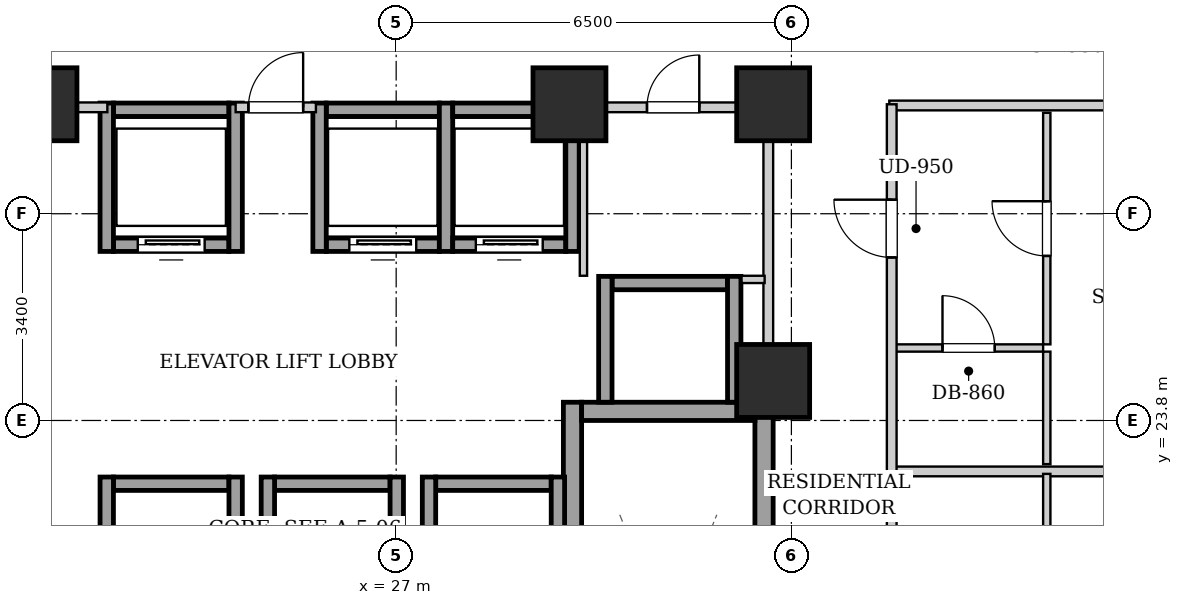
"""IFC4 building model, lengths in metres.
Left out: names, types, materials, properties, quantities, classifications, styles, units other than length and angle.
Written with IfcOpenShell. Run it as: python <this file> out.ifc"""

import sys

from ifc_helpers import new_model, si_unit, direction, frame, frame_2d, origin, origin_2d, place, context, subcontext, project, spatial, rectangle, extrude, element, fill, save


model = new_model("IFC4")
c1 = context("Model", 3, precision=1e-05, world=origin(), true_north=direction((0.0, 1.0)))
c2 = subcontext(c1, "Body", "Model", "MODEL_VIEW")
j1 = project(units=[si_unit("LENGTHUNIT", "METRE"), si_unit("PLANEANGLEUNIT", "RADIAN")], contexts=[c1])
p1 = place(None, origin())
s1 = spatial("IfcSite", under=j1, at=p1, CompositionType="ELEMENT")
p2 = place(p1, origin())
s2 = spatial("IfcBuilding", under=s1, at=p2, CompositionType="ELEMENT")
p3 = place(p2, frame((0.0, 0.0, 48.2)))
s3 = spatial("IfcBuildingStorey", under=s2, at=p3, CompositionType="ELEMENT", Elevation=48.2)
for number, where, z_axis, x_axis in (
    (1, (21.15, 29.0, 0.0), (0.0, 0.0, 1.0), (1.0, 0.0, 0.0)),
    (2, (29.85, 29.0, 0.0), (0.0, 0.0, 1.0), (1.0, 0.0, 0.0)),
    (3, (33.2, 29.0, 0.0), (0.0, 0.0, 1.0), (1.0, 0.0, 0.0)),
    (4, (33.2, 24.45, 0.0), (0.0, 0.0, 1.0), (1.0, 0.0, 0.0)),
):
    element("IfcColumn", number, at=place(p3, frame(where, z_axis=z_axis, x_axis=x_axis)), inside=s3, PredefinedType="COLUMN", context=c2, shape_type="SweptSolid", body=[
        extrude(rectangle(XDim=1.2, YDim=1.2, at=origin_2d()), origin(), (0.0, 0.0, 1.0), 3.2),
    ])
for number, where, z_axis, x_axis in (
    (5, (29.9, 15.1, 0.0), (0.0, 0.0, 1.0), (0.0, 1.0, 0.0)),
    (6, (33.05, 15.1, 0.0), (0.0, 0.0, 1.0), (0.0, 1.0, 0.0)),
):
    element("IfcWall", number, at=place(p3, frame(where, z_axis=z_axis, x_axis=x_axis)), inside=s3, PredefinedType="SHEAR", context=c2, shape_type="SweptSolid", body=[
        extrude(rectangle(XDim=9.0, YDim=0.3, at=frame_2d((4.5, 0.0))), origin(), (0.0, 0.0, 1.0), 2.94),
    ])
p4 = place(p3, frame((30.05, 23.95, 0.0), z_axis=(0.0, 0.0, 1.0), x_axis=(1.0, 0.0, 0.0)))
e7 = element("IfcWall", 7, at=p4, inside=s3, PredefinedType="SHEAR", context=c2, shape_type="SweptSolid", body=[
    extrude(rectangle(XDim=2.85, YDim=0.3, at=frame_2d((1.425, 0.0))), origin(), (0.0, 0.0, 1.0), 2.94),
])
p5 = place(p3, frame((22.35, 26.69, 0.0), z_axis=(0.0, 0.0, 1.0), x_axis=(1.0, 0.0, 0.0)))
e8 = element("IfcWall", 8, at=p5, inside=s3, PredefinedType="SHEAR", context=c2, shape_type="SweptSolid", body=[
    extrude(rectangle(XDim=1.9, YDim=0.22, at=frame_2d((0.95, 0.0))), origin(), (0.0, 0.0, 1.0), 2.94),
])
p6 = place(p5, frame((0.4, 0.0, 0.0)))
e9 = element("IfcOpeningElement", 9, at=p6, cuts=e8, PredefinedType="OPENING", context=c2, shape_type="SweptSolid", body=[
    extrude(rectangle(XDim=1.1, YDim=2.15, at=frame_2d((0.55, 1.075))), frame((0.0, 0.12, 0.0), z_axis=(0.0, -1.0, 0.0), x_axis=(1.0, 0.0, 0.0)), (0.0, 0.0, 1.0), 0.24),
])
p7 = place(p3, frame((22.35, 28.91, 0.0), z_axis=(0.0, 0.0, 1.0), x_axis=(1.0, 0.0, 0.0)))
e10 = element("IfcWall", 10, at=p7, inside=s3, PredefinedType="SHEAR", context=c2, shape_type="SweptSolid", body=[
    extrude(rectangle(XDim=1.9, YDim=0.22, at=frame_2d((0.95, 0.0))), origin(), (0.0, 0.0, 1.0), 2.94),
])
for number, where, z_axis, x_axis in (
    (11, (22.24, 26.58, 0.0), (0.0, 0.0, 1.0), (0.0, 1.0, 0.0)),
    (12, (24.36, 26.58, 0.0), (0.0, 0.0, 1.0), (0.0, 1.0, 0.0)),
):
    element("IfcWall", number, at=place(p3, frame(where, z_axis=z_axis, x_axis=x_axis)), inside=s3, PredefinedType="SHEAR", context=c2, shape_type="SweptSolid", body=[
        extrude(rectangle(XDim=2.44, YDim=0.22, at=frame_2d((1.22, 0.0))), origin(), (0.0, 0.0, 1.0), 2.94),
    ])
p8 = place(p3, frame((25.85, 26.69, 0.0), z_axis=(0.0, 0.0, 1.0), x_axis=(1.0, 0.0, 0.0)))
e13 = element("IfcWall", 13, at=p8, inside=s3, PredefinedType="SHEAR", context=c2, shape_type="SweptSolid", body=[
    extrude(rectangle(XDim=1.86, YDim=0.22, at=frame_2d((0.93, 0.0))), origin(), (0.0, 0.0, 1.0), 2.94),
])
p9 = place(p8, frame((0.38, 0.0, 0.0)))
e14 = element("IfcOpeningElement", 14, at=p9, cuts=e13, PredefinedType="OPENING", context=c2, shape_type="SweptSolid", body=[
    extrude(rectangle(XDim=1.1, YDim=2.15, at=frame_2d((0.55, 1.075))), frame((0.0, 0.12, 0.0), z_axis=(0.0, -1.0, 0.0), x_axis=(1.0, 0.0, 0.0)), (0.0, 0.0, 1.0), 0.24),
])
p10 = place(p3, frame((25.85, 28.91, 0.0), z_axis=(0.0, 0.0, 1.0), x_axis=(1.0, 0.0, 0.0)))
e15 = element("IfcWall", 15, at=p10, inside=s3, PredefinedType="SHEAR", context=c2, shape_type="SweptSolid", body=[
    extrude(rectangle(XDim=1.86, YDim=0.22, at=frame_2d((0.93, 0.0))), origin(), (0.0, 0.0, 1.0), 2.94),
])
for number, where, z_axis, x_axis in (
    (16, (25.74, 26.58, 0.0), (0.0, 0.0, 1.0), (0.0, 1.0, 0.0)),
    (17, (27.82, 26.58, 0.0), (0.0, 0.0, 1.0), (0.0, 1.0, 0.0)),
):
    element("IfcWall", number, at=place(p3, frame(where, z_axis=z_axis, x_axis=x_axis)), inside=s3, PredefinedType="SHEAR", context=c2, shape_type="SweptSolid", body=[
        extrude(rectangle(XDim=2.44, YDim=0.22, at=frame_2d((1.22, 0.0))), origin(), (0.0, 0.0, 1.0), 2.94),
    ])
p11 = place(p3, frame((27.93, 26.69, 0.0), z_axis=(0.0, 0.0, 1.0), x_axis=(1.0, 0.0, 0.0)))
e18 = element("IfcWall", 18, at=p11, inside=s3, PredefinedType="SHEAR", context=c2, shape_type="SweptSolid", body=[
    extrude(rectangle(XDim=1.86, YDim=0.22, at=frame_2d((0.93, 0.0))), origin(), (0.0, 0.0, 1.0), 2.94),
])
p12 = place(p11, frame((0.38, 0.0, 0.0)))
e19 = element("IfcOpeningElement", 19, at=p12, cuts=e18, PredefinedType="OPENING", context=c2, shape_type="SweptSolid", body=[
    extrude(rectangle(XDim=1.1, YDim=2.15, at=frame_2d((0.55, 1.075))), frame((0.0, 0.12, 0.0), z_axis=(0.0, -1.0, 0.0), x_axis=(1.0, 0.0, 0.0)), (0.0, 0.0, 1.0), 0.24),
])
p13 = place(p3, frame((27.93, 28.91, 0.0), z_axis=(0.0, 0.0, 1.0), x_axis=(1.0, 0.0, 0.0)))
e20 = element("IfcWall", 20, at=p13, inside=s3, PredefinedType="SHEAR", context=c2, shape_type="SweptSolid", body=[
    extrude(rectangle(XDim=1.86, YDim=0.22, at=frame_2d((0.93, 0.0))), origin(), (0.0, 0.0, 1.0), 2.94),
])
p14 = place(p3, frame((29.9, 26.58, 0.0), z_axis=(0.0, 0.0, 1.0), x_axis=(0.0, 1.0, 0.0)))
e21 = element("IfcWall", 21, at=p14, inside=s3, PredefinedType="SHEAR", context=c2, shape_type="SweptSolid", body=[
    extrude(rectangle(XDim=2.44, YDim=0.22, at=frame_2d((1.22, 0.0))), origin(), (0.0, 0.0, 1.0), 2.94),
])
p15 = place(p3, frame((22.35, 22.76, 0.0), z_axis=(0.0, 0.0, 1.0), x_axis=(1.0, 0.0, 0.0)))
e22 = element("IfcWall", 22, at=p15, inside=s3, PredefinedType="SHEAR", context=c2, shape_type="SweptSolid", body=[
    extrude(rectangle(XDim=1.9, YDim=0.22, at=frame_2d((0.95, 0.0))), origin(), (0.0, 0.0, 1.0), 2.94),
])
for number, where, z_axis, x_axis in (
    (23, (22.24, 20.43, 0.0), (0.0, 0.0, 1.0), (0.0, 1.0, 0.0)),
    (24, (24.36, 20.43, 0.0), (0.0, 0.0, 1.0), (0.0, 1.0, 0.0)),
):
    element("IfcWall", number, at=place(p3, frame(where, z_axis=z_axis, x_axis=x_axis)), inside=s3, PredefinedType="SHEAR", context=c2, shape_type="SweptSolid", body=[
        extrude(rectangle(XDim=2.44, YDim=0.22, at=frame_2d((1.22, 0.0))), origin(), (0.0, 0.0, 1.0), 2.94),
    ])
p16 = place(p3, frame((25.0, 22.76, 0.0), z_axis=(0.0, 0.0, 1.0), x_axis=(1.0, 0.0, 0.0)))
e25 = element("IfcWall", 25, at=p16, inside=s3, PredefinedType="SHEAR", context=c2, shape_type="SweptSolid", body=[
    extrude(rectangle(XDim=1.9, YDim=0.22, at=frame_2d((0.95, 0.0))), origin(), (0.0, 0.0, 1.0), 2.94),
])
for number, where, z_axis, x_axis in (
    (26, (24.89, 20.43, 0.0), (0.0, 0.0, 1.0), (0.0, 1.0, 0.0)),
    (27, (27.01, 20.43, 0.0), (0.0, 0.0, 1.0), (0.0, 1.0, 0.0)),
):
    element("IfcWall", number, at=place(p3, frame(where, z_axis=z_axis, x_axis=x_axis)), inside=s3, PredefinedType="SHEAR", context=c2, shape_type="SweptSolid", body=[
        extrude(rectangle(XDim=2.44, YDim=0.22, at=frame_2d((1.22, 0.0))), origin(), (0.0, 0.0, 1.0), 2.94),
    ])
p17 = place(p3, frame((27.65, 22.76, 0.0), z_axis=(0.0, 0.0, 1.0), x_axis=(1.0, 0.0, 0.0)))
e28 = element("IfcWall", 28, at=p17, inside=s3, PredefinedType="SHEAR", context=c2, shape_type="SweptSolid", body=[
    extrude(rectangle(XDim=1.9, YDim=0.22, at=frame_2d((0.95, 0.0))), origin(), (0.0, 0.0, 1.0), 2.94),
])
for number, where, z_axis, x_axis in (
    (29, (27.54, 20.43, 0.0), (0.0, 0.0, 1.0), (0.0, 1.0, 0.0)),
    (30, (29.66, 20.43, 0.0), (0.0, 0.0, 1.0), (0.0, 1.0, 0.0)),
):
    element("IfcWall", number, at=place(p3, frame(where, z_axis=z_axis, x_axis=x_axis)), inside=s3, PredefinedType="SHEAR", context=c2, shape_type="SweptSolid", body=[
        extrude(rectangle(XDim=2.44, YDim=0.22, at=frame_2d((1.22, 0.0))), origin(), (0.0, 0.0, 1.0), 2.94),
    ])
p18 = place(p3, frame((30.55, 26.06, 0.0), z_axis=(0.0, 0.0, 1.0), x_axis=(1.0, 0.0, 0.0)))
e31 = element("IfcWall", 31, at=p18, inside=s3, PredefinedType="SHEAR", context=c2, shape_type="SweptSolid", body=[
    extrude(rectangle(XDim=1.9, YDim=0.22, at=frame_2d((0.95, 0.0))), origin(), (0.0, 0.0, 1.0), 2.94),
])
for number, where, z_axis, x_axis in (
    (32, (30.44, 24.1, 0.0), (0.0, 0.0, 1.0), (0.0, 1.0, 0.0)),
    (33, (32.56, 24.1, 0.0), (0.0, 0.0, 1.0), (0.0, 1.0, 0.0)),
):
    element("IfcWall", number, at=place(p3, frame(where, z_axis=z_axis, x_axis=x_axis)), inside=s3, PredefinedType="SHEAR", context=c2, shape_type="SweptSolid", body=[
        extrude(rectangle(XDim=2.07, YDim=0.22, at=frame_2d((1.035, 0.0))), origin(), (0.0, 0.0, 1.0), 2.94),
    ])
p19 = place(p3, frame((33.12, 24.12, 0.0), z_axis=(0.0, 0.0, 1.0), x_axis=(0.0, 1.0, 0.0)))
e34 = element("IfcWall", 34, at=p19, inside=s3, PredefinedType="PARTITIONING", context=c2, shape_type="SweptSolid", body=[
    extrude(rectangle(XDim=4.76, YDim=0.16, at=frame_2d((2.38, 0.0))), origin(), (0.0, 0.0, 1.0), 2.275),
])
p20 = place(p3, frame((24.36, 28.95, 0.0), z_axis=(0.0, 0.0, 1.0), x_axis=(1.0, 0.0, 0.0)))
e35 = element("IfcWall", 35, at=p20, inside=s3, PredefinedType="PARTITIONING", context=c2, shape_type="SweptSolid", body=[
    extrude(rectangle(XDim=1.32, YDim=0.16, at=frame_2d((0.66, 0.0))), origin(), (0.0, 0.0, 1.0), 2.232),
])
p21 = place(p20, frame((0.21, 0.0, 0.0)))
e36 = element("IfcOpeningElement", 36, at=p21, cuts=e35, PredefinedType="OPENING", context=c2, shape_type="SweptSolid", body=[
    extrude(rectangle(XDim=0.9, YDim=2.05, at=frame_2d((0.45, 1.025))), frame((0.0, 0.09, 0.0), z_axis=(0.0, -1.0, 0.0), x_axis=(1.0, 0.0, 0.0)), (0.0, 0.0, 1.0), 0.18),
])
p22 = place(p3, frame((17.96, 28.95, 0.0), z_axis=(0.0, 0.0, 1.0), x_axis=(1.0, 0.0, 0.0)))
e37 = element("IfcWall", 37, at=p22, inside=s3, PredefinedType="PARTITIONING", context=c2, shape_type="SweptSolid", body=[
    extrude(rectangle(XDim=4.29, YDim=0.16, at=frame_2d((2.145, 0.0))), origin(), (0.0, 0.0, 1.0), 2.232),
])
p23 = place(p22, frame((1.57, 0.0, 0.0)))
e38 = element("IfcOpeningElement", 38, at=p23, cuts=e37, PredefinedType="OPENING", context=c2, shape_type="SweptSolid", body=[
    extrude(rectangle(XDim=0.86, YDim=2.05, at=frame_2d((0.43, 1.025))), frame((0.0, 0.09, 0.0), z_axis=(0.0, -1.0, 0.0), x_axis=(1.0, 0.0, 0.0)), (0.0, 0.0, 1.0), 0.18),
])
p24 = place(p3, frame((30.08, 26.18, 0.0), z_axis=(0.0, 0.0, 1.0), x_axis=(0.0, 1.0, 0.0)))
e39 = element("IfcWall", 39, at=p24, inside=s3, PredefinedType="PARTITIONING", context=c2, shape_type="SweptSolid", body=[
    extrude(rectangle(XDim=2.68, YDim=0.12, at=frame_2d((1.34, 0.0))), origin(), (0.0, 0.0, 1.0), 2.94),
])
p25 = place(p3, frame((32.68, 26.12, 0.0), z_axis=(0.0, 0.0, 1.0), x_axis=(1.0, 0.0, 0.0)))
e40 = element("IfcWall", 40, at=p25, inside=s3, PredefinedType="PARTITIONING", context=c2, shape_type="SweptSolid", body=[
    extrude(rectangle(XDim=0.38, YDim=0.12, at=frame_2d((0.19, 0.0))), origin(), (0.0, 0.0, 1.0), 2.94),
])
p26 = place(p3, frame((30.08, 28.95, 0.0), z_axis=(0.0, 0.0, 1.0), x_axis=(1.0, 0.0, 0.0)))
e41 = element("IfcWall", 41, at=p26, inside=s3, PredefinedType="PARTITIONING", context=c2, shape_type="SweptSolid", body=[
    extrude(rectangle(XDim=2.96, YDim=0.16, at=frame_2d((1.48, 0.0))), origin(), (0.0, 0.0, 1.0), 2.94),
])
p27 = place(p26, frame((1.045, 0.0, 0.0)))
e42 = element("IfcOpeningElement", 42, at=p27, cuts=e41, PredefinedType="OPENING", context=c2, shape_type="SweptSolid", body=[
    extrude(rectangle(XDim=0.86, YDim=2.05, at=frame_2d((0.43, 1.025))), frame((0.0, 0.09, 0.0), z_axis=(0.0, -1.0, 0.0), x_axis=(1.0, 0.0, 0.0)), (0.0, 0.0, 1.0), 0.18),
])
p28 = place(p3, frame((35.11, 28.98, 0.0), z_axis=(0.0, 0.0, 1.0), x_axis=(1.0, 0.0, 0.0)))
e43 = element("IfcWall", 43, at=p28, inside=s3, PredefinedType="PARTITIONING", context=c2, shape_type="SweptSolid", body=[
    extrude(rectangle(XDim=11.11, YDim=0.16, at=frame_2d((5.555, 0.0))), origin(), (0.0, 0.0, 1.0), 2.232),
])
p29 = place(p3, frame((35.19, 22.962, 0.0), z_axis=(0.0, 0.0, 1.0), x_axis=(1.0, 0.0, 0.0)))
e44 = element("IfcWall", 44, at=p29, inside=s3, PredefinedType="PARTITIONING", context=c2, shape_type="SweptSolid", body=[
    extrude(rectangle(XDim=11.03, YDim=0.16, at=frame_2d((5.515, 0.0))), origin(), (0.0, 0.0, 1.0), 2.94),
])
p30 = place(p3, frame((37.7, 17.489, 0.0), z_axis=(0.0, 0.0, 1.0), x_axis=(0.0, 1.0, 0.0)))
e45 = element("IfcWall", 45, at=p30, inside=s3, PredefinedType="PARTITIONING", context=c2, shape_type="SweptSolid", body=[
    extrude(rectangle(XDim=5.433, YDim=0.12, at=frame_2d((2.717, 0.0))), origin(), (0.0, 0.0, 1.0), 2.94),
])
p31 = place(p30, frame((2.266, 0.0, 0.0)))
e46 = element("IfcOpeningElement", 46, at=p31, cuts=e45, PredefinedType="OPENING", context=c2, shape_type="SweptSolid", body=[
    extrude(rectangle(XDim=0.9, YDim=2.05, at=frame_2d((0.45, 1.025))), frame((0.0, 0.07, 0.0), z_axis=(0.0, -1.0, 0.0), x_axis=(1.0, 0.0, 0.0)), (0.0, 0.0, 1.0), 0.14),
])
p32 = place(p3, frame((35.19, 24.992, 0.0), z_axis=(0.0, 0.0, 1.0), x_axis=(1.0, 0.0, 0.0)))
e47 = element("IfcWall", 47, at=p32, inside=s3, PredefinedType="PARTITIONING", context=c2, shape_type="SweptSolid", body=[
    extrude(rectangle(XDim=2.45, YDim=0.12, at=frame_2d((1.225, 0.0))), origin(), (0.0, 0.0, 1.0), 2.94),
])
p33 = place(p32, frame((0.795, 0.0, 0.0)))
e48 = element("IfcOpeningElement", 48, at=p33, cuts=e47, PredefinedType="OPENING", context=c2, shape_type="SweptSolid", body=[
    extrude(rectangle(XDim=0.86, YDim=2.05, at=frame_2d((0.43, 1.025))), frame((0.0, 0.07, 0.0), z_axis=(0.0, -1.0, 0.0), x_axis=(1.0, 0.0, 0.0)), (0.0, 0.0, 1.0), 0.14),
])
p34 = place(p3, frame((37.7, 23.082, 0.0), z_axis=(0.0, 0.0, 1.0), x_axis=(0.0, 1.0, 0.0)))
e49 = element("IfcWall", 49, at=p34, inside=s3, PredefinedType="PARTITIONING", context=c2, shape_type="SweptSolid", body=[
    extrude(rectangle(XDim=1.85, YDim=0.12, at=frame_2d((0.925, 0.0))), origin(), (0.0, 0.0, 1.0), 2.94),
])
p35 = place(p3, frame((37.7, 25.052, 0.0), z_axis=(0.0, 0.0, 1.0), x_axis=(0.0, 1.0, 0.0)))
e50 = element("IfcWall", 50, at=p35, inside=s3, PredefinedType="PARTITIONING", context=c2, shape_type="SweptSolid", body=[
    extrude(rectangle(XDim=3.808, YDim=0.12, at=frame_2d((1.904, 0.0))), origin(), (0.0, 0.0, 1.0), 2.94),
])
p36 = place(p35, frame((1.454, 0.0, 0.0)))
e51 = element("IfcOpeningElement", 51, at=p36, cuts=e50, PredefinedType="OPENING", context=c2, shape_type="SweptSolid", body=[
    extrude(rectangle(XDim=0.9, YDim=2.05, at=frame_2d((0.45, 1.025))), frame((0.0, 0.07, 0.0), z_axis=(0.0, -1.0, 0.0), x_axis=(1.0, 0.0, 0.0)), (0.0, 0.0, 1.0), 0.14),
])
p37 = place(p3, frame((35.15, 15.07, 0.0), z_axis=(0.0, 0.0, 1.0), x_axis=(0.0, 1.0, 0.0)))
e52 = element("IfcWall", 52, at=p37, inside=s3, PredefinedType="PARTITIONING", context=c2, shape_type="SweptSolid", body=[
    extrude(rectangle(XDim=13.93, YDim=0.16, at=frame_2d((6.965, 0.0))), origin(), (0.0, 0.0, 1.0), 2.94),
])
p38 = place(p37, frame((4.661, 0.0, 0.0)))
e53 = element("IfcOpeningElement", 53, at=p38, cuts=e52, PredefinedType="OPENING", context=c2, shape_type="SweptSolid", body=[
    extrude(rectangle(XDim=0.95, YDim=2.1, at=frame_2d((0.475, 1.05))), frame((0.0, 0.09, 0.0), z_axis=(0.0, -1.0, 0.0), x_axis=(1.0, 0.0, 0.0)), (0.0, 0.0, 1.0), 0.18),
])
p39 = place(p37, frame((11.411, 0.0, 0.0)))
e54 = element("IfcOpeningElement", 54, at=p39, cuts=e52, PredefinedType="OPENING", context=c2, shape_type="SweptSolid", body=[
    extrude(rectangle(XDim=0.95, YDim=2.1, at=frame_2d((0.475, 1.05))), frame((0.0, 0.09, 0.0), z_axis=(0.0, -1.0, 0.0), x_axis=(1.0, 0.0, 0.0)), (0.0, 0.0, 1.0), 0.18),
])
p40 = place(p6, origin())
e55 = element("IfcDoor", 55, at=p40, inside=s3, OperationType="SLIDING_TO_LEFT", PredefinedType="DOOR", context=c2, shape_type="SweptSolid", body=[
    extrude(rectangle(XDim=1.1, YDim=2.15, at=frame_2d((0.55, 1.075))), frame((0.0, 0.025, 0.0), z_axis=(0.0, -1.0, 0.0), x_axis=(1.0, 0.0, 0.0)), (0.0, 0.0, 1.0), 0.05),
])
fill(e9, e55)
p41 = place(p9, origin())
e56 = element("IfcDoor", 56, at=p41, inside=s3, OperationType="SLIDING_TO_LEFT", PredefinedType="DOOR", context=c2, shape_type="SweptSolid", body=[
    extrude(rectangle(XDim=1.1, YDim=2.15, at=frame_2d((0.55, 1.075))), frame((0.0, 0.025, 0.0), z_axis=(0.0, -1.0, 0.0), x_axis=(1.0, 0.0, 0.0)), (0.0, 0.0, 1.0), 0.05),
])
fill(e14, e56)
p42 = place(p12, origin())
e57 = element("IfcDoor", 57, at=p42, inside=s3, OperationType="SLIDING_TO_LEFT", PredefinedType="DOOR", context=c2, shape_type="SweptSolid", body=[
    extrude(rectangle(XDim=1.1, YDim=2.15, at=frame_2d((0.55, 1.075))), frame((0.0, 0.025, 0.0), z_axis=(0.0, -1.0, 0.0), x_axis=(1.0, 0.0, 0.0)), (0.0, 0.0, 1.0), 0.05),
])
fill(e19, e57)
p43 = place(p21, origin())
e58 = element("IfcDoor", 58, at=p43, inside=s3, OperationType="SINGLE_SWING_RIGHT", PredefinedType="DOOR", context=c2, shape_type="SweptSolid", body=[
    extrude(rectangle(XDim=0.9, YDim=2.05, at=frame_2d((0.45, 1.025))), frame((0.0, 0.025, 0.0), z_axis=(0.0, -1.0, 0.0), x_axis=(1.0, 0.0, 0.0)), (0.0, 0.0, 1.0), 0.05),
])
fill(e36, e58)
p44 = place(p27, origin())
e59 = element("IfcDoor", 59, at=p44, inside=s3, OperationType="SINGLE_SWING_RIGHT", PredefinedType="DOOR", context=c2, shape_type="SweptSolid", body=[
    extrude(rectangle(XDim=0.86, YDim=2.05, at=frame_2d((0.43, 1.025))), frame((0.0, 0.025, 0.0), z_axis=(0.0, -1.0, 0.0), x_axis=(1.0, 0.0, 0.0)), (0.0, 0.0, 1.0), 0.05),
])
fill(e42, e59)
p45 = place(p33, origin())
e60 = element("IfcDoor", 60, at=p45, inside=s3, OperationType="SINGLE_SWING_LEFT", PredefinedType="DOOR", context=c2, shape_type="SweptSolid", body=[
    extrude(rectangle(XDim=0.86, YDim=2.05, at=frame_2d((0.43, 1.025))), frame((0.0, 0.025, 0.0), z_axis=(0.0, -1.0, 0.0), x_axis=(1.0, 0.0, 0.0)), (0.0, 0.0, 1.0), 0.05),
])
fill(e48, e60)
p46 = place(p36, origin())
e61 = element("IfcDoor", 61, at=p46, inside=s3, OperationType="SINGLE_SWING_RIGHT", PredefinedType="DOOR", context=c2, shape_type="SweptSolid", body=[
    extrude(rectangle(XDim=0.9, YDim=2.05, at=frame_2d((0.45, 1.025))), frame((0.0, 0.025, 0.0), z_axis=(0.0, -1.0, 0.0), x_axis=(1.0, 0.0, 0.0)), (0.0, 0.0, 1.0), 0.05),
])
fill(e51, e61)
p47 = place(p39, origin())
e62 = element("IfcDoor", 62, at=p47, inside=s3, OperationType="SINGLE_SWING_RIGHT", PredefinedType="DOOR", context=c2, shape_type="SweptSolid", body=[
    extrude(rectangle(XDim=0.95, YDim=2.1, at=frame_2d((0.475, 1.05))), frame((0.0, 0.025, 0.0), z_axis=(0.0, -1.0, 0.0), x_axis=(1.0, 0.0, 0.0)), (0.0, 0.0, 1.0), 0.05),
])
fill(e54, e62)
save(model, sys.argv[1])
